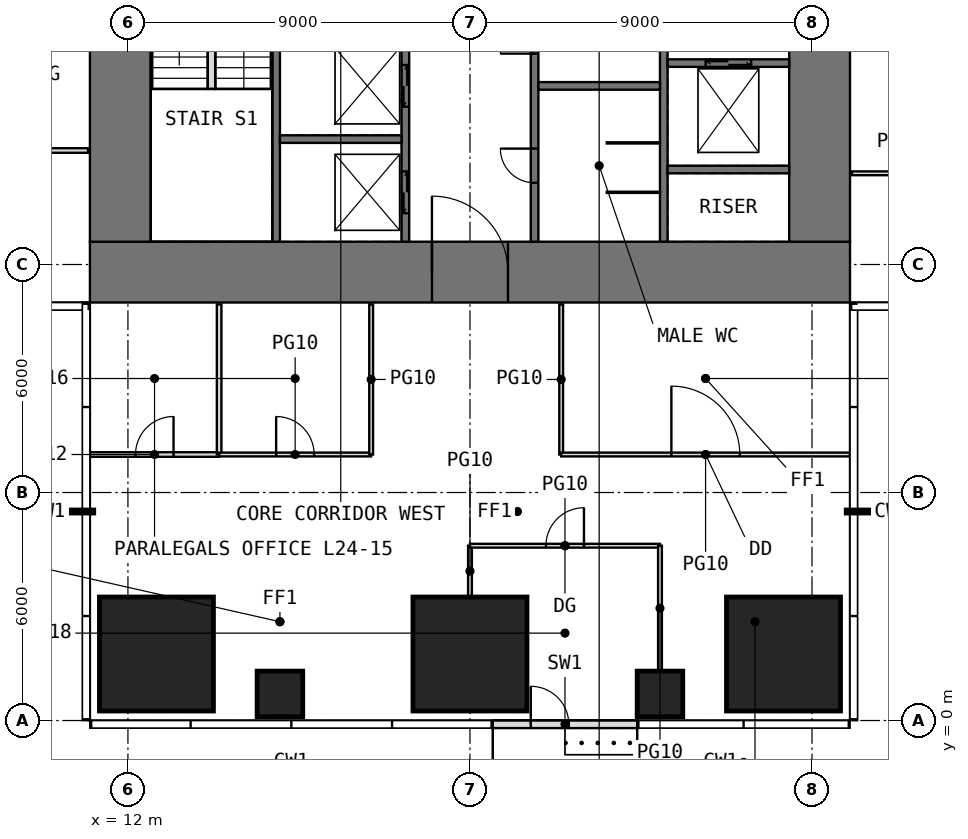
"""IFC4 building model, lengths in metres.
Left out: names, types, materials, properties, quantities, classifications, styles, units other than length and angle.
Written with IfcOpenShell. Run it as: python <this file> out.ifc"""

import sys

from ifc_helpers import new_model, si_unit, direction, frame, frame_2d, origin, origin_2d, place, context, subcontext, project, spatial, rectangle, extrude, element, fill, save


model = new_model("IFC4")
c1 = context("Model", 3, precision=1e-05, world=origin(), true_north=direction((0.0, 1.0)))
c2 = subcontext(c1, "Body", "Model", "MODEL_VIEW")
j1 = project(units=[si_unit("LENGTHUNIT", "METRE"), si_unit("PLANEANGLEUNIT", "RADIAN")], contexts=[c1])
p1 = place(None, origin())
s1 = spatial("IfcSite", under=j1, at=p1, CompositionType="ELEMENT")
p2 = place(p1, origin())
s2 = spatial("IfcBuilding", under=s1, at=p2, CompositionType="ELEMENT")
p3 = place(p2, frame((0.0, 0.0, 104.5)))
s3 = spatial("IfcBuildingStorey", under=s2, at=p3, CompositionType="ELEMENT", Elevation=104.5)
p4 = place(p3, frame((12.75, 1.75, 0.0), z_axis=(0.0, 0.0, 1.0), x_axis=(1.0, 0.0, 0.0)))
e1 = element("IfcColumn", 1, at=p4, inside=s3, PredefinedType="COLUMN", context=c2, shape_type="SweptSolid", body=[
    extrude(rectangle(XDim=3.0, YDim=3.0, at=origin_2d()), origin(), (0.0, 0.0, 1.0), 4.0),
])
p5 = place(p3, frame((16.0, 0.7, 0.0), z_axis=(0.0, 0.0, 1.0), x_axis=(1.0, 0.0, 0.0)))
e2 = element("IfcColumn", 2, at=p5, inside=s3, PredefinedType="COLUMN", context=c2, shape_type="SweptSolid", body=[
    extrude(rectangle(XDim=1.2, YDim=1.2, at=origin_2d()), origin(), (0.0, 0.0, 1.0), 4.0),
])
p6 = place(p3, frame((21.0, 1.75, 0.0), z_axis=(0.0, 0.0, 1.0), x_axis=(1.0, 0.0, 0.0)))
e3 = element("IfcColumn", 3, at=p6, inside=s3, PredefinedType="COLUMN", context=c2, shape_type="SweptSolid", body=[
    extrude(rectangle(XDim=3.0, YDim=3.0, at=origin_2d()), origin(), (0.0, 0.0, 1.0), 4.0),
])
p7 = place(p3, frame((26.0, 0.7, 0.0), z_axis=(0.0, 0.0, 1.0), x_axis=(1.0, 0.0, 0.0)))
e4 = element("IfcColumn", 4, at=p7, inside=s3, PredefinedType="COLUMN", context=c2, shape_type="SweptSolid", body=[
    extrude(rectangle(XDim=1.2, YDim=1.2, at=origin_2d()), origin(), (0.0, 0.0, 1.0), 4.0),
])
p8 = place(p3, frame((29.25, 1.75, 0.0), z_axis=(0.0, 0.0, 1.0), x_axis=(1.0, 0.0, 0.0)))
e5 = element("IfcColumn", 5, at=p8, inside=s3, PredefinedType="COLUMN", context=c2, shape_type="SweptSolid", body=[
    extrude(rectangle(XDim=3.0, YDim=3.0, at=origin_2d()), origin(), (0.0, 0.0, 1.0), 4.0),
])
p9 = place(p3, frame((21.6, -0.1, 0.0), z_axis=(0.0, 0.0, 1.0), x_axis=(1.0, 0.0, 0.0)))
e6 = element("IfcWall", 6, at=p9, inside=s3, PredefinedType="USERDEFINED", context=c2, shape_type="SweptSolid", body=[
    extrude(rectangle(XDim=3.8, YDim=0.2, at=frame_2d((1.9, 0.0))), origin(), (0.0, 0.0, 1.0), 3.75),
])
p10 = place(p9, frame((1.0, 0.0, 0.0)))
e7 = element("IfcOpeningElement", 7, at=p10, cuts=e6, PredefinedType="OPENING", context=c2, shape_type="SweptSolid", body=[
    extrude(rectangle(XDim=1.0, YDim=2.4, at=frame_2d((0.5, 1.2))), frame((0.0, 0.11, 0.0), z_axis=(0.0, -1.0, 0.0), x_axis=(1.0, 0.0, 0.0)), (0.0, 0.0, 1.0), 0.22),
])
p11 = place(p3, frame((11.0, 11.8, -0.05), z_axis=(0.0, 0.0, 1.0), x_axis=(1.0, 0.0, 0.0)))
e8 = element("IfcWall", 8, at=p11, inside=s3, PredefinedType="SHEAR", context=c2, shape_type="SweptSolid", body=[
    extrude(rectangle(XDim=20.0, YDim=1.6, at=frame_2d((10.0, 0.0))), origin(), (0.0, 0.0, 1.0), 4.0),
])
p12 = place(p11, frame((9.0, 0.0, 0.05)))
e9 = element("IfcOpeningElement", 9, at=p12, cuts=e8, PredefinedType="OPENING", context=c2, shape_type="SweptSolid", body=[
    extrude(rectangle(XDim=2.0, YDim=2.2, at=frame_2d((1.0, 1.1))), frame((0.0, 0.81, 0.0), z_axis=(0.0, -1.0, 0.0), x_axis=(1.0, 0.0, 0.0)), (0.0, 0.0, 1.0), 1.62),
])
p13 = place(p3, frame((11.8, 12.6, -0.05), z_axis=(0.0, 0.0, 1.0), x_axis=(0.0, 1.0, 0.0)))
e10 = element("IfcWall", 10, at=p13, inside=s3, PredefinedType="SHEAR", context=c2, shape_type="SweptSolid", body=[
    extrude(rectangle(XDim=16.8, YDim=1.6, at=frame_2d((8.4, 0.0))), origin(), (0.0, 0.0, 1.0), 4.0),
])
p14 = place(p13, frame((9.9, 0.0, 0.05)))
e11 = element("IfcOpeningElement", 11, at=p14, cuts=e10, PredefinedType="OPENING", context=c2, shape_type="SweptSolid", body=[
    extrude(rectangle(XDim=1.0, YDim=2.2, at=frame_2d((0.5, 1.1))), frame((0.0, 0.81, 0.0), z_axis=(0.0, -1.0, 0.0), x_axis=(1.0, 0.0, 0.0)), (0.0, 0.0, 1.0), 1.62),
])
p15 = place(p3, frame((30.2, 12.6, -0.05), z_axis=(0.0, 0.0, 1.0), x_axis=(0.0, 1.0, 0.0)))
e12 = element("IfcWall", 12, at=p15, inside=s3, PredefinedType="SHEAR", context=c2, shape_type="SweptSolid", body=[
    extrude(rectangle(XDim=16.8, YDim=1.6, at=frame_2d((8.4, 0.0))), origin(), (0.0, 0.0, 1.0), 4.0),
])
p16 = place(p15, frame((5.9, 0.0, 0.05)))
e13 = element("IfcOpeningElement", 13, at=p16, cuts=e12, PredefinedType="OPENING", context=c2, shape_type="SweptSolid", body=[
    extrude(rectangle(XDim=1.0, YDim=2.2, at=frame_2d((0.5, 1.1))), frame((0.0, 0.81, 0.0), z_axis=(0.0, -1.0, 0.0), x_axis=(1.0, 0.0, 0.0)), (0.0, 0.0, 1.0), 1.62),
])
p17 = place(p3, frame((15.9, 12.6, -0.05), z_axis=(0.0, 0.0, 1.0), x_axis=(0.0, 1.0, 0.0)))
e14 = element("IfcWall", 14, at=p17, inside=s3, PredefinedType="SHEAR", context=c2, shape_type="SweptSolid", body=[
    extrude(rectangle(XDim=16.8, YDim=0.2, at=frame_2d((8.4, 0.0))), origin(), (0.0, 0.0, 1.0), 4.0),
])
p18 = place(p17, frame((8.9, 0.0, 0.05)))
e15 = element("IfcOpeningElement", 15, at=p18, cuts=e14, PredefinedType="OPENING", context=c2, shape_type="SweptSolid", body=[
    extrude(rectangle(XDim=1.0, YDim=2.2, at=frame_2d((0.5, 1.1))), frame((0.0, 0.11, 0.0), z_axis=(0.0, -1.0, 0.0), x_axis=(1.0, 0.0, 0.0)), (0.0, 0.0, 1.0), 0.22),
])
p19 = place(p3, frame((19.3, 12.6, -0.05), z_axis=(0.0, 0.0, 1.0), x_axis=(0.0, 1.0, 0.0)))
e16 = element("IfcWall", 16, at=p19, inside=s3, PredefinedType="SHEAR", context=c2, shape_type="SweptSolid", body=[
    extrude(rectangle(XDim=16.8, YDim=0.2, at=frame_2d((8.4, 0.0))), origin(), (0.0, 0.0, 1.0), 4.0),
])
p20 = place(p19, frame((8.7, 0.0, 0.05)))
e17 = element("IfcOpeningElement", 17, at=p20, cuts=e16, PredefinedType="OPENING", context=c2, shape_type="SweptSolid", body=[
    extrude(rectangle(XDim=1.0, YDim=2.2, at=frame_2d((0.5, 1.1))), frame((0.0, 0.11, 0.0), z_axis=(0.0, -1.0, 0.0), x_axis=(1.0, 0.0, 0.0)), (0.0, 0.0, 1.0), 0.22),
])
p21 = place(p19, frame((10.85, 0.0, 0.05)))
e18 = element("IfcOpeningElement", 18, at=p21, cuts=e16, PredefinedType="OPENING", context=c2, shape_type="SweptSolid", body=[
    extrude(rectangle(XDim=0.9, YDim=2.2, at=frame_2d((0.45, 1.1))), frame((0.0, 0.11, 0.0), z_axis=(0.0, -1.0, 0.0), x_axis=(1.0, 0.0, 0.0)), (0.0, 0.0, 1.0), 0.22),
])
p22 = place(p19, frame((13.3, 0.0, 0.05)))
e19 = element("IfcOpeningElement", 19, at=p22, cuts=e16, PredefinedType="OPENING", context=c2, shape_type="SweptSolid", body=[
    extrude(rectangle(XDim=1.0, YDim=2.2, at=frame_2d((0.5, 1.1))), frame((0.0, 0.11, 0.0), z_axis=(0.0, -1.0, 0.0), x_axis=(1.0, 0.0, 0.0)), (0.0, 0.0, 1.0), 0.22),
])
p23 = place(p19, frame((15.55, 0.0, 0.05)))
e20 = element("IfcOpeningElement", 20, at=p23, cuts=e16, PredefinedType="OPENING", context=c2, shape_type="SweptSolid", body=[
    extrude(rectangle(XDim=0.9, YDim=2.2, at=frame_2d((0.45, 1.1))), frame((0.0, 0.11, 0.0), z_axis=(0.0, -1.0, 0.0), x_axis=(1.0, 0.0, 0.0)), (0.0, 0.0, 1.0), 0.22),
])
p24 = place(p19, frame((0.75, 0.0, 0.05)))
e21 = element("IfcOpeningElement", 21, at=p24, cuts=e16, PredefinedType="OPENING", context=c2, shape_type="SweptSolid", body=[
    extrude(rectangle(XDim=1.1, YDim=2.2, at=frame_2d((0.55, 1.1))), frame((0.0, 0.11, 0.0), z_axis=(0.0, -1.0, 0.0), x_axis=(1.0, 0.0, 0.0)), (0.0, 0.0, 1.0), 0.22),
])
p25 = place(p19, frame((3.55, 0.0, 0.05)))
e22 = element("IfcOpeningElement", 22, at=p25, cuts=e16, PredefinedType="OPENING", context=c2, shape_type="SweptSolid", body=[
    extrude(rectangle(XDim=1.1, YDim=2.2, at=frame_2d((0.55, 1.1))), frame((0.0, 0.11, 0.0), z_axis=(0.0, -1.0, 0.0), x_axis=(1.0, 0.0, 0.0)), (0.0, 0.0, 1.0), 0.22),
])
p26 = place(p19, frame((6.35, 0.0, 0.05)))
e23 = element("IfcOpeningElement", 23, at=p26, cuts=e16, PredefinedType="OPENING", context=c2, shape_type="SweptSolid", body=[
    extrude(rectangle(XDim=1.1, YDim=2.2, at=frame_2d((0.55, 1.1))), frame((0.0, 0.11, 0.0), z_axis=(0.0, -1.0, 0.0), x_axis=(1.0, 0.0, 0.0)), (0.0, 0.0, 1.0), 0.22),
])
p27 = place(p3, frame((22.7, 12.6, -0.05), z_axis=(0.0, 0.0, 1.0), x_axis=(0.0, 1.0, 0.0)))
e24 = element("IfcWall", 24, at=p27, inside=s3, PredefinedType="SHEAR", context=c2, shape_type="SweptSolid", body=[
    extrude(rectangle(XDim=16.8, YDim=0.2, at=frame_2d((8.4, 0.0))), origin(), (0.0, 0.0, 1.0), 4.0),
])
p28 = place(p27, frame((7.1, 0.0, 0.05)))
e25 = element("IfcOpeningElement", 25, at=p28, cuts=e24, PredefinedType="OPENING", context=c2, shape_type="SweptSolid", body=[
    extrude(rectangle(XDim=1.0, YDim=2.2, at=frame_2d((0.5, 1.1))), frame((0.0, 0.11, 0.0), z_axis=(0.0, -1.0, 0.0), x_axis=(1.0, 0.0, 0.0)), (0.0, 0.0, 1.0), 0.22),
])
p29 = place(p27, frame((1.55, 0.0, 0.05)))
e26 = element("IfcOpeningElement", 26, at=p29, cuts=e24, PredefinedType="OPENING", context=c2, shape_type="SweptSolid", body=[
    extrude(rectangle(XDim=0.9, YDim=2.2, at=frame_2d((0.45, 1.1))), frame((0.0, 0.11, 0.0), z_axis=(0.0, -1.0, 0.0), x_axis=(1.0, 0.0, 0.0)), (0.0, 0.0, 1.0), 0.22),
])
p30 = place(p27, frame((4.95, 0.0, 0.05)))
e27 = element("IfcOpeningElement", 27, at=p30, cuts=e24, PredefinedType="OPENING", context=c2, shape_type="SweptSolid", body=[
    extrude(rectangle(XDim=0.9, YDim=2.2, at=frame_2d((0.45, 1.1))), frame((0.0, 0.11, 0.0), z_axis=(0.0, -1.0, 0.0), x_axis=(1.0, 0.0, 0.0)), (0.0, 0.0, 1.0), 0.22),
])
p31 = place(p27, frame((9.4, 0.0, 0.05)))
e28 = element("IfcOpeningElement", 28, at=p31, cuts=e24, PredefinedType="OPENING", context=c2, shape_type="SweptSolid", body=[
    extrude(rectangle(XDim=1.0, YDim=2.2, at=frame_2d((0.5, 1.1))), frame((0.0, 0.11, 0.0), z_axis=(0.0, -1.0, 0.0), x_axis=(1.0, 0.0, 0.0)), (0.0, 0.0, 1.0), 0.22),
])
p32 = place(p3, frame((26.1, 12.6, -0.05), z_axis=(0.0, 0.0, 1.0), x_axis=(0.0, 1.0, 0.0)))
e29 = element("IfcWall", 29, at=p32, inside=s3, PredefinedType="SHEAR", context=c2, shape_type="SweptSolid", body=[
    extrude(rectangle(XDim=16.8, YDim=0.2, at=frame_2d((8.4, 0.0))), origin(), (0.0, 0.0, 1.0), 4.0),
])
p33 = place(p32, frame((6.9, 0.0, 0.05)))
e30 = element("IfcOpeningElement", 30, at=p33, cuts=e29, PredefinedType="OPENING", context=c2, shape_type="SweptSolid", body=[
    extrude(rectangle(XDim=1.0, YDim=2.2, at=frame_2d((0.5, 1.1))), frame((0.0, 0.11, 0.0), z_axis=(0.0, -1.0, 0.0), x_axis=(1.0, 0.0, 0.0)), (0.0, 0.0, 1.0), 0.22),
])
for number, where, z_axis, x_axis in (
    (31, (16.0, 15.3, -0.05), (0.0, 0.0, 1.0), (1.0, 0.0, 0.0)),
    (32, (22.8, 16.7, -0.05), (0.0, 0.0, 1.0), (1.0, 0.0, 0.0)),
    (33, (26.2, 14.5, -0.05), (0.0, 0.0, 1.0), (1.0, 0.0, 0.0)),
):
    element("IfcWall", number, at=place(p3, frame(where, z_axis=z_axis, x_axis=x_axis)), inside=s3, PredefinedType="SHEAR", context=c2, shape_type="SweptSolid", body=[
        extrude(rectangle(XDim=3.2, YDim=0.2, at=frame_2d((1.6, 0.0))), origin(), (0.0, 0.0, 1.0), 4.0),
    ])
p34 = place(p3, frame((26.2, 17.3, -0.05), z_axis=(0.0, 0.0, 1.0), x_axis=(1.0, 0.0, 0.0)))
e34 = element("IfcWall", 34, at=p34, inside=s3, PredefinedType="SHEAR", context=c2, shape_type="SweptSolid", body=[
    extrude(rectangle(XDim=3.2, YDim=0.2, at=frame_2d((1.6, 0.0))), origin(), (0.0, 0.0, 1.0), 4.0),
])
p35 = place(p34, frame((1.0, 0.0, 0.05)))
e35 = element("IfcOpeningElement", 35, at=p35, cuts=e34, PredefinedType="OPENING", context=c2, shape_type="SweptSolid", body=[
    extrude(rectangle(XDim=1.2, YDim=2.2, at=frame_2d((0.6, 1.1))), frame((0.0, 0.11, 0.0), z_axis=(0.0, -1.0, 0.0), x_axis=(1.0, 0.0, 0.0)), (0.0, 0.0, 1.0), 0.22),
])
for number, where, z_axis, x_axis in (
    (36, (24.6, 13.9, 0.0), (0.0, 0.0, 1.0), (1.0, 0.0, 0.0)),
    (37, (24.6, 15.2, 0.0), (0.0, 0.0, 1.0), (1.0, 0.0, 0.0)),
):
    element("IfcWall", number, at=place(p3, frame(where, z_axis=z_axis, x_axis=x_axis)), inside=s3, PredefinedType="PARTITIONING", context=c2, shape_type="SweptSolid", body=[
        extrude(rectangle(XDim=1.4, YDim=0.03, at=frame_2d((0.7, 0.0))), origin(), (0.0, 0.0, 1.0), 3.75),
    ])
p36 = place(p3, frame((7.0, 15.0, 0.0), z_axis=(0.0, 0.0, 1.0), x_axis=(1.0, 0.0, 0.0)))
e38 = element("IfcWall", 38, at=p36, inside=s3, PredefinedType="PARTITIONING", context=c2, shape_type="SweptSolid", body=[
    extrude(rectangle(XDim=3.95, YDim=0.12, at=frame_2d((1.975, 0.0))), origin(), (0.0, 0.0, 1.0), 3.75),
])
p37 = place(p3, frame((11.0, 7.0, 0.0), z_axis=(0.0, 0.0, 1.0), x_axis=(1.0, 0.0, 0.0)))
e39 = element("IfcWall", 39, at=p37, inside=s3, PredefinedType="PARTITIONING", context=c2, shape_type="SweptSolid", body=[
    extrude(rectangle(XDim=3.4, YDim=0.12, at=frame_2d((1.7, 0.0))), origin(), (0.0, 0.0, 1.0), 3.75),
])
p38 = place(p37, frame((1.2, 0.0, 0.0)))
e40 = element("IfcOpeningElement", 40, at=p38, cuts=e39, PredefinedType="OPENING", context=c2, shape_type="SweptSolid", body=[
    extrude(rectangle(XDim=1.0, YDim=2.2, at=frame_2d((0.5, 1.1))), frame((0.0, 0.07, 0.0), z_axis=(0.0, -1.0, 0.0), x_axis=(1.0, 0.0, 0.0)), (0.0, 0.0, 1.0), 0.14),
])
p39 = place(p3, frame((14.4, 7.0, 0.0), z_axis=(0.0, 0.0, 1.0), x_axis=(0.0, 1.0, 0.0)))
e41 = element("IfcWall", 41, at=p39, inside=s3, PredefinedType="PARTITIONING", context=c2, shape_type="SweptSolid", body=[
    extrude(rectangle(XDim=3.95, YDim=0.12, at=frame_2d((1.975, 0.0))), origin(), (0.0, 0.0, 1.0), 3.75),
])
p40 = place(p3, frame((14.4, 7.0, 0.0), z_axis=(0.0, 0.0, 1.0), x_axis=(1.0, 0.0, 0.0)))
e42 = element("IfcWall", 42, at=p40, inside=s3, PredefinedType="PARTITIONING", context=c2, shape_type="SweptSolid", body=[
    extrude(rectangle(XDim=4.0, YDim=0.1, at=frame_2d((2.0, 0.0))), origin(), (0.0, 0.0, 1.0), 3.75),
])
p41 = place(p40, frame((1.5, 0.0, 0.0)))
e43 = element("IfcOpeningElement", 43, at=p41, cuts=e42, PredefinedType="OPENING", context=c2, shape_type="SweptSolid", body=[
    extrude(rectangle(XDim=1.0, YDim=2.4, at=frame_2d((0.5, 1.2))), frame((0.0, 0.06, 0.0), z_axis=(0.0, -1.0, 0.0), x_axis=(1.0, 0.0, 0.0)), (0.0, 0.0, 1.0), 0.12),
])
p42 = place(p3, frame((18.4, 7.0, 0.0), z_axis=(0.0, 0.0, 1.0), x_axis=(0.0, 1.0, 0.0)))
e44 = element("IfcWall", 44, at=p42, inside=s3, PredefinedType="PARTITIONING", context=c2, shape_type="SweptSolid", body=[
    extrude(rectangle(XDim=3.95, YDim=0.1, at=frame_2d((1.975, 0.0))), origin(), (0.0, 0.0, 1.0), 3.75),
])
p43 = place(p3, frame((21.0, 3.26, 0.0), z_axis=(0.0, 0.0, 1.0), x_axis=(0.0, 1.0, 0.0)))
e45 = element("IfcWall", 45, at=p43, inside=s3, PredefinedType="PARTITIONING", context=c2, shape_type="SweptSolid", body=[
    extrude(rectangle(XDim=1.34, YDim=0.1, at=frame_2d((0.67, 0.0))), origin(), (0.0, 0.0, 1.0), 3.75),
])
p44 = place(p3, frame((21.0, 4.6, 0.0), z_axis=(0.0, 0.0, 1.0), x_axis=(1.0, 0.0, 0.0)))
e46 = element("IfcWall", 46, at=p44, inside=s3, PredefinedType="PARTITIONING", context=c2, shape_type="SweptSolid", body=[
    extrude(rectangle(XDim=5.0, YDim=0.1, at=frame_2d((2.5, 0.0))), origin(), (0.0, 0.0, 1.0), 3.75),
])
p45 = place(p44, frame((2.0, 0.0, 0.0)))
e47 = element("IfcOpeningElement", 47, at=p45, cuts=e46, PredefinedType="OPENING", context=c2, shape_type="SweptSolid", body=[
    extrude(rectangle(XDim=1.0, YDim=2.4, at=frame_2d((0.5, 1.2))), frame((0.0, 0.06, 0.0), z_axis=(0.0, -1.0, 0.0), x_axis=(1.0, 0.0, 0.0)), (0.0, 0.0, 1.0), 0.12),
])
p46 = place(p3, frame((23.4, 7.0, 0.0), z_axis=(0.0, 0.0, 1.0), x_axis=(0.0, 1.0, 0.0)))
e48 = element("IfcWall", 48, at=p46, inside=s3, PredefinedType="PARTITIONING", context=c2, shape_type="SweptSolid", body=[
    extrude(rectangle(XDim=3.95, YDim=0.1, at=frame_2d((1.975, 0.0))), origin(), (0.0, 0.0, 1.0), 3.75),
])
p47 = place(p3, frame((23.4, 7.0, 0.0), z_axis=(0.0, 0.0, 1.0), x_axis=(1.0, 0.0, 0.0)))
e49 = element("IfcWall", 49, at=p47, inside=s3, PredefinedType="PARTITIONING", context=c2, shape_type="SweptSolid", body=[
    extrude(rectangle(XDim=7.6, YDim=0.1, at=frame_2d((3.8, 0.0))), origin(), (0.0, 0.0, 1.0), 3.75),
])
p48 = place(p47, frame((2.9, 0.0, 0.0)))
e50 = element("IfcOpeningElement", 50, at=p48, cuts=e49, PredefinedType="OPENING", context=c2, shape_type="SweptSolid", body=[
    extrude(rectangle(XDim=1.8, YDim=2.4, at=frame_2d((0.9, 1.2))), frame((0.0, 0.06, 0.0), z_axis=(0.0, -1.0, 0.0), x_axis=(1.0, 0.0, 0.0)), (0.0, 0.0, 1.0), 0.12),
])
p49 = place(p3, frame((26.0, 1.31, 0.0), z_axis=(0.0, 0.0, 1.0), x_axis=(0.0, 1.0, 0.0)))
e51 = element("IfcWall", 51, at=p49, inside=s3, PredefinedType="PARTITIONING", context=c2, shape_type="SweptSolid", body=[
    extrude(rectangle(XDim=3.29, YDim=0.1, at=frame_2d((1.645, 0.0))), origin(), (0.0, 0.0, 1.0), 3.75),
])
p50 = place(p3, frame((31.05, 14.4, 0.0), z_axis=(0.0, 0.0, 1.0), x_axis=(1.0, 0.0, 0.0)))
e52 = element("IfcWall", 52, at=p50, inside=s3, PredefinedType="PARTITIONING", context=c2, shape_type="SweptSolid", body=[
    extrude(rectangle(XDim=3.95, YDim=0.1, at=frame_2d((1.975, 0.0))), origin(), (0.0, 0.0, 1.0), 3.75),
])
p51 = place(p3, frame((14.2, 16.62, 0.0), z_axis=(0.0, 0.0, 1.0), x_axis=(0.0, 1.0, 0.0)))
e53 = element("IfcWall", 53, at=p51, inside=s3, PredefinedType="PARTITIONING", context=c2, shape_type="SweptSolid", body=[
    extrude(rectangle(XDim=3.08, YDim=0.2, at=frame_2d((1.54, 0.0))), origin(), (0.0, 0.0, 1.0), 4.0),
])
p52 = place(p10, origin())
e54 = element("IfcDoor", 54, at=p52, inside=s3, OperationType="SINGLE_SWING_LEFT", PredefinedType="DOOR", context=c2, shape_type="SweptSolid", body=[
    extrude(rectangle(XDim=1.0, YDim=2.4, at=frame_2d((0.5, 1.2))), frame((0.0, 0.025, 0.0), z_axis=(0.0, -1.0, 0.0), x_axis=(1.0, 0.0, 0.0)), (0.0, 0.0, 1.0), 0.05),
])
fill(e7, e54)
p53 = place(p12, origin())
e55 = element("IfcDoor", 55, at=p53, inside=s3, OperationType="DOUBLE_DOOR_SINGLE_SWING", PredefinedType="DOOR", context=c2, shape_type="SweptSolid", body=[
    extrude(rectangle(XDim=2.0, YDim=2.2, at=frame_2d((1.0, 1.1))), frame((0.0, 0.025, 0.0), z_axis=(0.0, -1.0, 0.0), x_axis=(1.0, 0.0, 0.0)), (0.0, 0.0, 1.0), 0.05),
])
fill(e9, e55)
p54 = place(p29, origin())
e56 = element("IfcDoor", 56, at=p54, inside=s3, OperationType="SINGLE_SWING_RIGHT", PredefinedType="DOOR", context=c2, shape_type="SweptSolid", body=[
    extrude(rectangle(XDim=0.9, YDim=2.2, at=frame_2d((0.45, 1.1))), frame((0.0, 0.025, 0.0), z_axis=(0.0, -1.0, 0.0), x_axis=(1.0, 0.0, 0.0)), (0.0, 0.0, 1.0), 0.05),
])
fill(e26, e56)
p55 = place(p30, origin())
e57 = element("IfcDoor", 57, at=p55, inside=s3, OperationType="SINGLE_SWING_LEFT", PredefinedType="DOOR", context=c2, shape_type="SweptSolid", body=[
    extrude(rectangle(XDim=0.9, YDim=2.2, at=frame_2d((0.45, 1.1))), frame((0.0, 0.025, 0.0), z_axis=(0.0, -1.0, 0.0), x_axis=(1.0, 0.0, 0.0)), (0.0, 0.0, 1.0), 0.05),
])
fill(e27, e57)
p56 = place(p38, origin())
e58 = element("IfcDoor", 58, at=p56, inside=s3, OperationType="SINGLE_SWING_RIGHT", PredefinedType="DOOR", context=c2, shape_type="SweptSolid", body=[
    extrude(rectangle(XDim=1.0, YDim=2.2, at=frame_2d((0.5, 1.1))), frame((0.0, 0.025, 0.0), z_axis=(0.0, -1.0, 0.0), x_axis=(1.0, 0.0, 0.0)), (0.0, 0.0, 1.0), 0.05),
])
fill(e40, e58)
p57 = place(p41, origin())
e59 = element("IfcDoor", 59, at=p57, inside=s3, OperationType="SINGLE_SWING_LEFT", PredefinedType="DOOR", context=c2, shape_type="SweptSolid", body=[
    extrude(rectangle(XDim=1.0, YDim=2.4, at=frame_2d((0.5, 1.2))), frame((0.0, 0.025, 0.0), z_axis=(0.0, -1.0, 0.0), x_axis=(1.0, 0.0, 0.0)), (0.0, 0.0, 1.0), 0.05),
])
fill(e43, e59)
p58 = place(p48, origin())
e60 = element("IfcDoor", 60, at=p58, inside=s3, OperationType="DOUBLE_DOOR_SINGLE_SWING", PredefinedType="DOOR", context=c2, shape_type="SweptSolid", body=[
    extrude(rectangle(XDim=1.8, YDim=2.4, at=frame_2d((0.9, 1.2))), frame((0.0, 0.025, 0.0), z_axis=(0.0, -1.0, 0.0), x_axis=(1.0, 0.0, 0.0)), (0.0, 0.0, 1.0), 0.05),
])
fill(e50, e60)
p59 = place(p45, origin())
e61 = element("IfcDoor", 61, at=p59, inside=s3, OperationType="SINGLE_SWING_RIGHT", PredefinedType="DOOR", context=c2, shape_type="SweptSolid", body=[
    extrude(rectangle(XDim=1.0, YDim=2.4, at=frame_2d((0.5, 1.2))), frame((0.0, 0.025, 0.0), z_axis=(0.0, -1.0, 0.0), x_axis=(1.0, 0.0, 0.0)), (0.0, 0.0, 1.0), 0.05),
])
fill(e47, e61)
p60 = place(p24, origin())
e62 = element("IfcDoor", 62, at=p60, inside=s3, OperationType="DOUBLE_DOOR_SLIDING", PredefinedType="DOOR", context=c2, shape_type="SweptSolid", body=[
    extrude(rectangle(XDim=1.1, YDim=2.2, at=frame_2d((0.55, 1.1))), frame((0.0, 0.025, 0.0), z_axis=(0.0, -1.0, 0.0), x_axis=(1.0, 0.0, 0.0)), (0.0, 0.0, 1.0), 0.05),
])
fill(e21, e62)
p61 = place(p25, origin())
e63 = element("IfcDoor", 63, at=p61, inside=s3, OperationType="DOUBLE_DOOR_SLIDING", PredefinedType="DOOR", context=c2, shape_type="SweptSolid", body=[
    extrude(rectangle(XDim=1.1, YDim=2.2, at=frame_2d((0.55, 1.1))), frame((0.0, 0.025, 0.0), z_axis=(0.0, -1.0, 0.0), x_axis=(1.0, 0.0, 0.0)), (0.0, 0.0, 1.0), 0.05),
])
fill(e22, e63)
p62 = place(p35, origin())
e64 = element("IfcDoor", 64, at=p62, inside=s3, OperationType="DOUBLE_DOOR_SLIDING", PredefinedType="DOOR", context=c2, shape_type="SweptSolid", body=[
    extrude(rectangle(XDim=1.2, YDim=2.2, at=frame_2d((0.6, 1.1))), frame((0.0, 0.025, 0.0), z_axis=(0.0, -1.0, 0.0), x_axis=(1.0, 0.0, 0.0)), (0.0, 0.0, 1.0), 0.05),
])
fill(e35, e64)
save(model, sys.argv[1])
